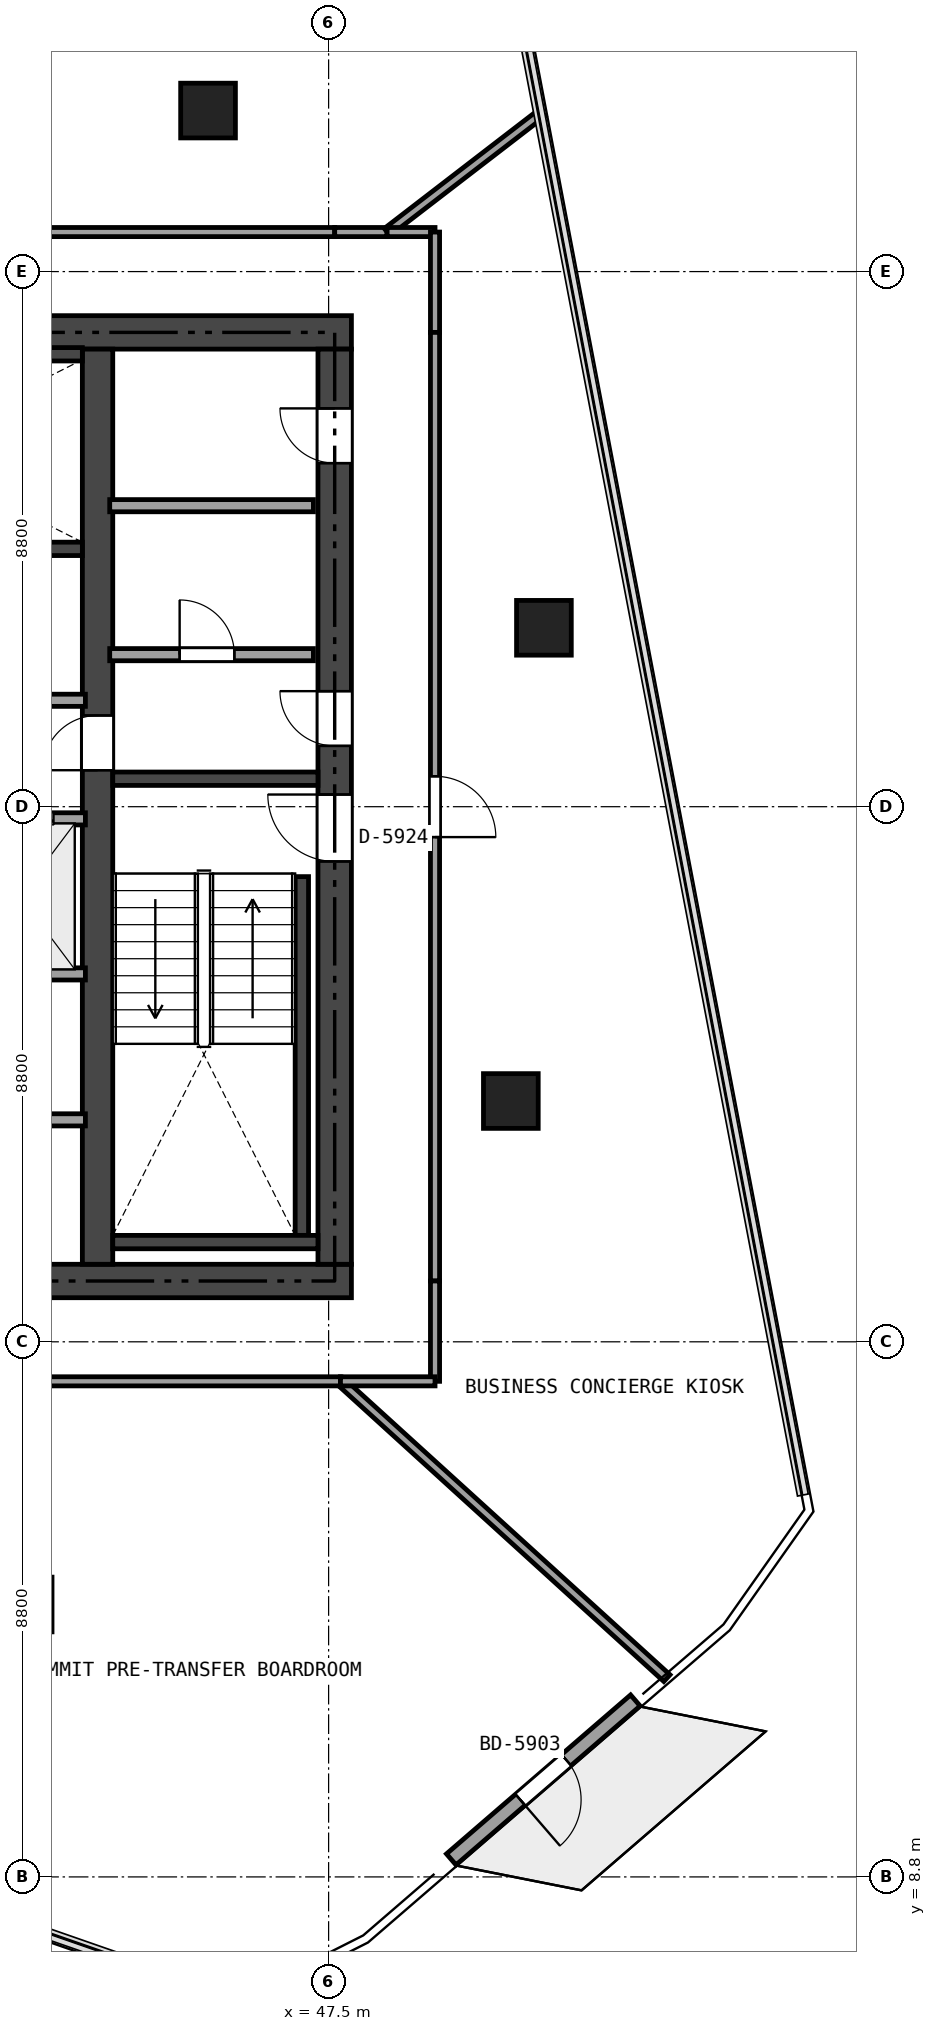
"""IFC4 building model, lengths in metres.
Left out: names, types, materials, properties, quantities, classifications, styles, units other than length and angle.
Written with IfcOpenShell. Run it as: python <this file> out.ifc"""

import sys

from ifc_helpers import new_model, si_unit, direction, frame, frame_2d, origin, origin_2d, place, context, subcontext, project, spatial, rectangle, extrude, element, fill, save


model = new_model("IFC4")
c1 = context("Model", 3, precision=1e-05, world=origin(), true_north=direction((0.0, 1.0)))
c2 = subcontext(c1, "Body", "Model", "MODEL_VIEW")
j1 = project(units=[si_unit("LENGTHUNIT", "METRE"), si_unit("PLANEANGLEUNIT", "RADIAN")], contexts=[c1])
p1 = place(None, origin())
s1 = spatial("IfcSite", under=j1, at=p1, CompositionType="ELEMENT")
p2 = place(p1, origin())
s2 = spatial("IfcBuilding", under=s1, at=p2, CompositionType="ELEMENT")
p3 = place(p2, frame((0.0, 0.0, 220.2)))
s3 = spatial("IfcBuildingStorey", under=s2, at=p3, CompositionType="ELEMENT", Elevation=220.2)
p4 = place(p3, frame((26.525, 18.6, 0.0), z_axis=(0.0, 0.0, 1.0), x_axis=(1.0, 0.0, 0.0)))
e1 = element("IfcWall", 1, at=p4, inside=s3, PredefinedType="SHEAR", context=c2, shape_type="SweptSolid", body=[
    extrude(rectangle(XDim=21.35, YDim=0.55, at=frame_2d((10.675, 0.0))), origin(), (0.0, 0.0, 1.0), 3.24),
])
p5 = place(p4, frame((12.4, 0.0, 0.0)))
e2 = element("IfcOpeningElement", 2, at=p5, cuts=e1, PredefinedType="OPENING", context=c2, shape_type="SweptSolid", body=[
    extrude(rectangle(XDim=1.15, YDim=2.15, at=frame_2d((0.575, 1.075))), frame((0.0, 0.285, 0.0), z_axis=(0.0, -1.0, 0.0), x_axis=(1.0, 0.0, 0.0)), (0.0, 0.0, 1.0), 0.57),
])
p6 = place(p4, frame((5.225, 0.0, 0.0)))
e3 = element("IfcOpeningElement", 3, at=p6, cuts=e1, PredefinedType="OPENING", context=c2, shape_type="SweptSolid", body=[
    extrude(rectangle(XDim=0.9, YDim=2.1, at=frame_2d((0.45, 1.05))), frame((0.0, 0.285, 0.0), z_axis=(0.0, -1.0, 0.0), x_axis=(1.0, 0.0, 0.0)), (0.0, 0.0, 1.0), 0.57),
])
p7 = place(p3, frame((26.525, 34.2, 0.0), z_axis=(0.0, 0.0, 1.0), x_axis=(1.0, 0.0, 0.0)))
e4 = element("IfcWall", 4, at=p7, inside=s3, PredefinedType="SHEAR", context=c2, shape_type="SweptSolid", body=[
    extrude(rectangle(XDim=21.35, YDim=0.55, at=frame_2d((10.675, 0.0))), origin(), (0.0, 0.0, 1.0), 3.24),
])
p8 = place(p7, frame((9.675, 0.0, 0.0)))
e5 = element("IfcOpeningElement", 5, at=p8, cuts=e4, PredefinedType="OPENING", context=c2, shape_type="SweptSolid", body=[
    extrude(rectangle(XDim=1.1, YDim=2.15, at=frame_2d((0.55, 1.075))), frame((0.0, 0.285, 0.0), z_axis=(0.0, -1.0, 0.0), x_axis=(1.0, 0.0, 0.0)), (0.0, 0.0, 1.0), 0.57),
])
p9 = place(p7, frame((1.925, 0.0, 0.0)))
e6 = element("IfcOpeningElement", 6, at=p9, cuts=e4, PredefinedType="OPENING", context=c2, shape_type="SweptSolid", body=[
    extrude(rectangle(XDim=0.9, YDim=2.1, at=frame_2d((0.45, 1.05))), frame((0.0, 0.285, 0.0), z_axis=(0.0, -1.0, 0.0), x_axis=(1.0, 0.0, 0.0)), (0.0, 0.0, 1.0), 0.57),
])
p10 = place(p7, frame((6.225, 0.0, 0.0)))
e7 = element("IfcOpeningElement", 7, at=p10, cuts=e4, PredefinedType="OPENING", context=c2, shape_type="SweptSolid", body=[
    extrude(rectangle(XDim=0.9, YDim=2.1, at=frame_2d((0.45, 1.05))), frame((0.0, 0.285, 0.0), z_axis=(0.0, -1.0, 0.0), x_axis=(1.0, 0.0, 0.0)), (0.0, 0.0, 1.0), 0.57),
])
p11 = place(p3, frame((47.6, 18.875, 0.0), z_axis=(0.0, 0.0, 1.0), x_axis=(0.0, 1.0, 0.0)))
e8 = element("IfcWall", 8, at=p11, inside=s3, PredefinedType="SHEAR", context=c2, shape_type="SweptSolid", body=[
    extrude(rectangle(XDim=15.05, YDim=0.55, at=frame_2d((7.525, 0.0))), origin(), (0.0, 0.0, 1.0), 3.24),
])
p12 = place(p11, frame((6.625, 0.0, 0.0)))
e9 = element("IfcOpeningElement", 9, at=p12, cuts=e8, PredefinedType="OPENING", context=c2, shape_type="SweptSolid", body=[
    extrude(rectangle(XDim=1.1, YDim=2.15, at=frame_2d((0.55, 1.075))), frame((0.0, 0.285, 0.0), z_axis=(0.0, -1.0, 0.0), x_axis=(1.0, 0.0, 0.0)), (0.0, 0.0, 1.0), 0.57),
])
p13 = place(p11, frame((8.525, 0.0, 0.0)))
e10 = element("IfcOpeningElement", 10, at=p13, cuts=e8, PredefinedType="OPENING", context=c2, shape_type="SweptSolid", body=[
    extrude(rectangle(XDim=0.9, YDim=2.1, at=frame_2d((0.45, 1.05))), frame((0.0, 0.285, 0.0), z_axis=(0.0, -1.0, 0.0), x_axis=(1.0, 0.0, 0.0)), (0.0, 0.0, 1.0), 0.57),
])
p14 = place(p11, frame((13.175, 0.0, 0.0)))
e11 = element("IfcOpeningElement", 11, at=p14, cuts=e8, PredefinedType="OPENING", context=c2, shape_type="SweptSolid", body=[
    extrude(rectangle(XDim=0.9, YDim=2.1, at=frame_2d((0.45, 1.05))), frame((0.0, 0.285, 0.0), z_axis=(0.0, -1.0, 0.0), x_axis=(1.0, 0.0, 0.0)), (0.0, 0.0, 1.0), 0.57),
])
p15 = place(p3, frame((43.7, 18.875, 0.0), z_axis=(0.0, 0.0, 1.0), x_axis=(0.0, 1.0, 0.0)))
e12 = element("IfcWall", 12, at=p15, inside=s3, PredefinedType="SHEAR", context=c2, shape_type="SweptSolid", body=[
    extrude(rectangle(XDim=15.05, YDim=0.5, at=frame_2d((7.525, 0.0))), origin(), (0.0, 0.0, 1.0), 3.24),
])
p16 = place(p15, frame((8.125, 0.0, 0.0)))
e13 = element("IfcOpeningElement", 13, at=p16, cuts=e12, PredefinedType="OPENING", context=c2, shape_type="SweptSolid", body=[
    extrude(rectangle(XDim=0.9, YDim=2.1, at=frame_2d((0.45, 1.05))), frame((0.0, 0.26, 0.0), z_axis=(0.0, -1.0, 0.0), x_axis=(1.0, 0.0, 0.0)), (0.0, 0.0, 1.0), 0.52),
])
p17 = place(p3, frame((43.95, 26.86, 0.0), z_axis=(0.0, 0.0, 1.0), x_axis=(1.0, 0.0, 0.0)))
e14 = element("IfcWall", 14, at=p17, inside=s3, PredefinedType="SHEAR", context=c2, shape_type="SweptSolid", body=[
    extrude(rectangle(XDim=3.375, YDim=0.22, at=frame_2d((1.688, 0.0))), origin(), (0.0, 0.0, 1.0), 3.24),
])
p18 = place(p3, frame((47.06, 19.35, 0.0), z_axis=(0.0, 0.0, 1.0), x_axis=(0.0, 1.0, 0.0)))
e15 = element("IfcWall", 15, at=p18, inside=s3, PredefinedType="SHEAR", context=c2, shape_type="SweptSolid", body=[
    extrude(rectangle(XDim=5.9, YDim=0.22, at=frame_2d((2.95, 0.0))), origin(), (0.0, 0.0, 1.0), 3.24),
])
p19 = place(p3, frame((43.95, 19.24, 0.0), z_axis=(0.0, 0.0, 1.0), x_axis=(1.0, 0.0, 0.0)))
e16 = element("IfcWall", 16, at=p19, inside=s3, PredefinedType="SHEAR", context=c2, shape_type="SweptSolid", body=[
    extrude(rectangle(XDim=3.375, YDim=0.22, at=frame_2d((1.688, 0.0))), origin(), (0.0, 0.0, 1.0), 3.24),
])
p20 = place(p3, frame((35.84, 30.64, 0.0), z_axis=(0.0, 0.0, 1.0), x_axis=(1.0, 0.0, 0.0)))
e17 = element("IfcWall", 17, at=p20, inside=s3, PredefinedType="SHEAR", context=c2, shape_type="SweptSolid", body=[
    extrude(rectangle(XDim=7.61, YDim=0.22, at=frame_2d((3.805, 0.0))), origin(), (0.0, 0.0, 1.0), 3.24),
])
p21 = place(p3, frame((37.55, 33.84, 0.0), z_axis=(0.0, 0.0, 1.0), x_axis=(1.0, 0.0, 0.0)))
e18 = element("IfcWall", 18, at=p21, inside=s3, PredefinedType="SHEAR", context=c2, shape_type="SweptSolid", body=[
    extrude(rectangle(XDim=5.9, YDim=0.22, at=frame_2d((2.95, 0.0))), origin(), (0.0, 0.0, 1.0), 3.24),
])
for number, where, z_axis, x_axis in (
    (19, (51.041, 29.342, 0.0), (0.0, 0.0, 1.0), (1.0, 0.0, 0.0)),
    (20, (45.517, 37.848, 0.0), (0.0, 0.0, 1.0), (1.0, 0.0, 0.0)),
    (21, (42.501, 13.28, 0.0), (0.0, 0.0, 1.0), (1.0, 0.0, 0.0)),
    (22, (50.497, 21.56, 0.0), (0.0, 0.0, 1.0), (1.0, 0.0, 0.0)),
):
    element("IfcColumn", number, at=place(p3, frame(where, z_axis=z_axis, x_axis=x_axis)), inside=s3, PredefinedType="COLUMN", context=c2, shape_type="SweptSolid", body=[
        extrude(rectangle(XDim=0.9, YDim=0.9, at=origin_2d()), origin(), (0.0, 0.0, 1.0), 3.24),
    ])
p22 = place(p3, frame((52.545, 11.702, 0.0), z_axis=(0.0, 0.0, 1.0), x_axis=(-0.756938273596, -0.653486380857, 0.0)))
e23 = element("IfcWall", 23, at=p22, inside=s3, PredefinedType="SOLIDWALL", context=c2, shape_type="SweptSolid", body=[
    extrude(rectangle(XDim=4.0, YDim=0.24, at=frame_2d((2.0, 0.0))), origin(), (0.0, 0.0, 1.0), 3.24),
])
p23 = place(p22, frame((1.5, 0.0, 0.0)))
e24 = element("IfcOpeningElement", 24, at=p23, cuts=e23, PredefinedType="OPENING", context=c2, shape_type="SweptSolid", body=[
    extrude(rectangle(XDim=1.0, YDim=2.15, at=frame_2d((0.5, 1.075))), frame((0.0, 0.13, 0.0), z_axis=(0.0, -1.0, 0.0), x_axis=(1.0, 0.0, 0.0)), (0.0, 0.0, 1.0), 0.26),
])
p24 = place(p3, frame((43.9, 28.9, 0.0), z_axis=(0.0, 0.0, 1.0), x_axis=(1.0, 0.0, 0.0)))
e25 = element("IfcWall", 25, at=p24, inside=s3, PredefinedType="SOLIDWALL", context=c2, shape_type="SweptSolid", body=[
    extrude(rectangle(XDim=3.35, YDim=0.2, at=frame_2d((1.675, 0.0))), origin(), (0.0, 0.0, 1.0), 3.24),
])
p25 = place(p24, frame((1.15, 0.0, 0.0)))
e26 = element("IfcOpeningElement", 26, at=p25, cuts=e25, PredefinedType="OPENING", context=c2, shape_type="SweptSolid", body=[
    extrude(rectangle(XDim=0.9, YDim=2.1, at=frame_2d((0.45, 1.05))), frame((0.0, 0.11, 0.0), z_axis=(0.0, -1.0, 0.0), x_axis=(1.0, 0.0, 0.0)), (0.0, 0.0, 1.0), 0.22),
])
p26 = place(p3, frame((43.9, 31.35, 0.0), z_axis=(0.0, 0.0, 1.0), x_axis=(1.0, 0.0, 0.0)))
e27 = element("IfcWall", 27, at=p26, inside=s3, PredefinedType="SOLIDWALL", context=c2, shape_type="SweptSolid", body=[
    extrude(rectangle(XDim=3.35, YDim=0.2, at=frame_2d((1.675, 0.0))), origin(), (0.0, 0.0, 1.0), 3.24),
])
p27 = place(p3, frame((35.62, 28.15, 0.0), z_axis=(0.0, 0.0, 1.0), x_axis=(1.0, 0.0, 0.0)))
e28 = element("IfcWall", 28, at=p27, inside=s3, PredefinedType="SOLIDWALL", context=c2, shape_type="SweptSolid", body=[
    extrude(rectangle(XDim=7.88, YDim=0.2, at=frame_2d((3.94, 0.0))), origin(), (0.0, 0.0, 1.0), 3.24),
])
p28 = place(p3, frame((35.62, 26.2, 0.0), z_axis=(0.0, 0.0, 1.0), x_axis=(1.0, 0.0, 0.0)))
e29 = element("IfcWall", 29, at=p28, inside=s3, PredefinedType="SOLIDWALL", context=c2, shape_type="SweptSolid", body=[
    extrude(rectangle(XDim=7.88, YDim=0.2, at=frame_2d((3.94, 0.0))), origin(), (0.0, 0.0, 1.0), 3.24),
])
p29 = place(p28, frame((0.405, 0.0, 0.0)))
e30 = element("IfcOpeningElement", 30, at=p29, cuts=e29, PredefinedType="OPENING", context=c2, shape_type="SweptSolid", body=[
    extrude(rectangle(XDim=1.1, YDim=2.15, at=frame_2d((0.55, 1.075))), frame((0.0, 0.11, 0.0), z_axis=(0.0, -1.0, 0.0), x_axis=(1.0, 0.0, 0.0)), (0.0, 0.0, 1.0), 0.22),
])
p30 = place(p28, frame((2.355, 0.0, 0.0)))
e31 = element("IfcOpeningElement", 31, at=p30, cuts=e29, PredefinedType="OPENING", context=c2, shape_type="SweptSolid", body=[
    extrude(rectangle(XDim=1.1, YDim=2.15, at=frame_2d((0.55, 1.075))), frame((0.0, 0.11, 0.0), z_axis=(0.0, -1.0, 0.0), x_axis=(1.0, 0.0, 0.0)), (0.0, 0.0, 1.0), 0.22),
])
p31 = place(p28, frame((4.305, 0.0, 0.0)))
e32 = element("IfcOpeningElement", 32, at=p31, cuts=e29, PredefinedType="OPENING", context=c2, shape_type="SweptSolid", body=[
    extrude(rectangle(XDim=1.1, YDim=2.15, at=frame_2d((0.55, 1.075))), frame((0.0, 0.11, 0.0), z_axis=(0.0, -1.0, 0.0), x_axis=(1.0, 0.0, 0.0)), (0.0, 0.0, 1.0), 0.22),
])
p32 = place(p28, frame((6.255, 0.0, 0.0)))
e33 = element("IfcOpeningElement", 33, at=p32, cuts=e29, PredefinedType="OPENING", context=c2, shape_type="SweptSolid", body=[
    extrude(rectangle(XDim=1.1, YDim=2.15, at=frame_2d((0.55, 1.075))), frame((0.0, 0.11, 0.0), z_axis=(0.0, -1.0, 0.0), x_axis=(1.0, 0.0, 0.0)), (0.0, 0.0, 1.0), 0.22),
])
p33 = place(p3, frame((35.62, 23.65, 0.0), z_axis=(0.0, 0.0, 1.0), x_axis=(1.0, 0.0, 0.0)))
e34 = element("IfcWall", 34, at=p33, inside=s3, PredefinedType="SOLIDWALL", context=c2, shape_type="SweptSolid", body=[
    extrude(rectangle(XDim=7.88, YDim=0.2, at=frame_2d((3.94, 0.0))), origin(), (0.0, 0.0, 1.0), 2.761),
])
p34 = place(p3, frame((35.62, 21.25, 0.0), z_axis=(0.0, 0.0, 1.0), x_axis=(1.0, 0.0, 0.0)))
e35 = element("IfcWall", 35, at=p34, inside=s3, PredefinedType="SOLIDWALL", context=c2, shape_type="SweptSolid", body=[
    extrude(rectangle(XDim=7.88, YDim=0.2, at=frame_2d((3.94, 0.0))), origin(), (0.0, 0.0, 1.0), 3.24),
])
p35 = place(p34, frame((1.13, 0.0, 0.0)))
e36 = element("IfcOpeningElement", 36, at=p35, cuts=e35, PredefinedType="OPENING", context=c2, shape_type="SweptSolid", body=[
    extrude(rectangle(XDim=0.9, YDim=2.1, at=frame_2d((0.45, 1.05))), frame((0.0, 0.11, 0.0), z_axis=(0.0, -1.0, 0.0), x_axis=(1.0, 0.0, 0.0)), (0.0, 0.0, 1.0), 0.22),
])
p36 = place(p34, frame((5.73, 0.0, 0.0)))
e37 = element("IfcOpeningElement", 37, at=p36, cuts=e35, PredefinedType="OPENING", context=c2, shape_type="SweptSolid", body=[
    extrude(rectangle(XDim=0.9, YDim=2.1, at=frame_2d((0.45, 1.05))), frame((0.0, 0.11, 0.0), z_axis=(0.0, -1.0, 0.0), x_axis=(1.0, 0.0, 0.0)), (0.0, 0.0, 1.0), 0.22),
])
p37 = place(p3, frame((42.87, 35.85, 0.0), z_axis=(0.0, 0.0, 1.0), x_axis=(1.0, 0.0, 0.0)))
e38 = element("IfcWall", 38, at=p37, inside=s3, PredefinedType="PARTITIONING", context=c2, shape_type="SweptSolid", body=[
    extrude(rectangle(XDim=4.73, YDim=0.15, at=frame_2d((2.365, 0.0))), origin(), (0.0, 0.0, 1.0), 2.617),
])
p38 = place(p3, frame((47.6, 35.85, 0.0), z_axis=(0.0, 0.0, 1.0), x_axis=(1.0, 0.0, 0.0)))
e39 = element("IfcWall", 39, at=p38, inside=s3, PredefinedType="PARTITIONING", context=c2, shape_type="SweptSolid", body=[
    extrude(rectangle(XDim=0.862, YDim=0.15, at=frame_2d((0.431, 0.0))), origin(), (0.0, 0.0, 1.0), 3.24),
])
p39 = place(p3, frame((48.462, 35.85, 0.0), z_axis=(0.0, 0.0, 1.0), x_axis=(0.7925055996, 0.609864636294, 0.0)))
e40 = element("IfcWall", 40, at=p39, inside=s3, PredefinedType="PARTITIONING", context=c2, shape_type="SweptSolid", body=[
    extrude(rectangle(XDim=3.22, YDim=0.15, at=frame_2d((1.61, 0.0))), origin(), (0.0, 0.0, 1.0), 3.24),
])
p40 = place(p3, frame((53.064, 12.069, 0.0), z_axis=(0.0, 0.0, 1.0), x_axis=(-0.739937028387, 0.672676143491, 0.0)))
e41 = element("IfcWall", 41, at=p40, inside=s3, PredefinedType="PARTITIONING", context=c2, shape_type="SweptSolid", body=[
    extrude(rectangle(XDim=7.256, YDim=0.15, at=frame_2d((3.628, 0.0))), origin(), (0.0, 0.0, 1.0), 3.24),
])
p41 = place(p3, frame((47.695, 16.95, 0.0), z_axis=(0.0, 0.0, 1.0), x_axis=(-1.0, 0.0, 0.0)))
e42 = element("IfcWall", 42, at=p41, inside=s3, PredefinedType="PARTITIONING", context=c2, shape_type="SweptSolid", body=[
    extrude(rectangle(XDim=12.851, YDim=0.15, at=frame_2d((6.426, 0.0))), origin(), (0.0, 0.0, 1.0), 2.617),
])
p42 = place(p41, frame((5.926, 0.0, 0.0)))
e43 = element("IfcOpeningElement", 43, at=p42, cuts=e42, PredefinedType="OPENING", context=c2, shape_type="SweptSolid", body=[
    extrude(rectangle(XDim=1.0, YDim=2.15, at=frame_2d((0.5, 1.075))), frame((0.0, 0.085, 0.0), z_axis=(0.0, -1.0, 0.0), x_axis=(1.0, 0.0, 0.0)), (0.0, 0.0, 1.0), 0.17),
])
p43 = place(p3, frame((48.462, 35.85, 0.0), z_axis=(0.0, 0.0, 1.0), x_axis=(1.0, 0.0, 0.0)))
e44 = element("IfcWall", 44, at=p43, inside=s3, PredefinedType="PARTITIONING", context=c2, shape_type="SweptSolid", body=[
    extrude(rectangle(XDim=0.788, YDim=0.15, at=frame_2d((0.394, 0.0))), origin(), (0.0, 0.0, 1.0), 3.24),
])
p44 = place(p3, frame((49.25, 35.85, 0.0), z_axis=(0.0, 0.0, 1.0), x_axis=(0.0, -1.0, 0.0)))
e45 = element("IfcWall", 45, at=p44, inside=s3, PredefinedType="PARTITIONING", context=c2, shape_type="SweptSolid", body=[
    extrude(rectangle(XDim=1.65, YDim=0.15, at=frame_2d((0.825, 0.0))), origin(), (0.0, 0.0, 1.0), 3.24),
])
p45 = place(p3, frame((49.25, 34.2, 0.0), z_axis=(0.0, 0.0, 1.0), x_axis=(0.0, -1.0, 0.0)))
e46 = element("IfcWall", 46, at=p45, inside=s3, PredefinedType="PARTITIONING", context=c2, shape_type="SweptSolid", body=[
    extrude(rectangle(XDim=15.6, YDim=0.15, at=frame_2d((7.8, 0.0))), origin(), (0.0, 0.0, 1.0), 2.617),
])
p46 = place(p45, frame((7.3, 0.0, 0.0)))
e47 = element("IfcOpeningElement", 47, at=p46, cuts=e46, PredefinedType="OPENING", context=c2, shape_type="SweptSolid", body=[
    extrude(rectangle(XDim=1.0, YDim=2.15, at=frame_2d((0.5, 1.075))), frame((0.0, 0.085, 0.0), z_axis=(0.0, -1.0, 0.0), x_axis=(1.0, 0.0, 0.0)), (0.0, 0.0, 1.0), 0.17),
])
p47 = place(p3, frame((49.25, 18.6, 0.0), z_axis=(0.0, 0.0, 1.0), x_axis=(0.0, -1.0, 0.0)))
e48 = element("IfcWall", 48, at=p47, inside=s3, PredefinedType="PARTITIONING", context=c2, shape_type="SweptSolid", body=[
    extrude(rectangle(XDim=1.65, YDim=0.15, at=frame_2d((0.825, 0.0))), origin(), (0.0, 0.0, 1.0), 3.24),
])
p48 = place(p3, frame((49.25, 16.95, 0.0), z_axis=(0.0, 0.0, 1.0), x_axis=(-1.0, 0.0, 0.0)))
e49 = element("IfcWall", 49, at=p48, inside=s3, PredefinedType="PARTITIONING", context=c2, shape_type="SweptSolid", body=[
    extrude(rectangle(XDim=1.555, YDim=0.15, at=frame_2d((0.777, 0.0))), origin(), (0.0, 0.0, 1.0), 3.24),
])
p49 = place(p23, origin())
e50 = element("IfcDoor", 50, at=p49, inside=s3, OperationType="SINGLE_SWING_RIGHT", PredefinedType="DOOR", context=c2, shape_type="SweptSolid", body=[
    extrude(rectangle(XDim=1.0, YDim=2.15, at=frame_2d((0.5, 1.075))), frame((0.0, 0.025, 0.0), z_axis=(0.0, -1.0, 0.0), x_axis=(1.0, 0.0, 0.0)), (0.0, 0.0, 1.0), 0.05),
])
fill(e24, e50)
p50 = place(p12, origin())
e51 = element("IfcDoor", 51, at=p50, inside=s3, OperationType="SINGLE_SWING_RIGHT", PredefinedType="DOOR", context=c2, shape_type="SweptSolid", body=[
    extrude(rectangle(XDim=1.1, YDim=2.15, at=frame_2d((0.55, 1.075))), frame((0.0, 0.025, 0.0), z_axis=(0.0, -1.0, 0.0), x_axis=(1.0, 0.0, 0.0)), (0.0, 0.0, 1.0), 0.05),
])
fill(e9, e51)
p51 = place(p16, origin())
e52 = element("IfcDoor", 52, at=p51, inside=s3, OperationType="SINGLE_SWING_LEFT", PredefinedType="DOOR", context=c2, shape_type="SweptSolid", body=[
    extrude(rectangle(XDim=0.9, YDim=2.1, at=frame_2d((0.45, 1.05))), frame((0.0, 0.025, 0.0), z_axis=(0.0, -1.0, 0.0), x_axis=(1.0, 0.0, 0.0)), (0.0, 0.0, 1.0), 0.05),
])
fill(e13, e52)
p52 = place(p13, origin())
e53 = element("IfcDoor", 53, at=p52, inside=s3, OperationType="SINGLE_SWING_RIGHT", PredefinedType="DOOR", context=c2, shape_type="SweptSolid", body=[
    extrude(rectangle(XDim=0.9, YDim=2.1, at=frame_2d((0.45, 1.05))), frame((0.0, 0.025, 0.0), z_axis=(0.0, -1.0, 0.0), x_axis=(1.0, 0.0, 0.0)), (0.0, 0.0, 1.0), 0.05),
])
fill(e10, e53)
p53 = place(p25, origin())
e54 = element("IfcDoor", 54, at=p53, inside=s3, OperationType="SINGLE_SWING_LEFT", PredefinedType="DOOR", context=c2, shape_type="SweptSolid", body=[
    extrude(rectangle(XDim=0.9, YDim=2.1, at=frame_2d((0.45, 1.05))), frame((0.0, 0.025, 0.0), z_axis=(0.0, -1.0, 0.0), x_axis=(1.0, 0.0, 0.0)), (0.0, 0.0, 1.0), 0.05),
])
fill(e26, e54)
p54 = place(p14, origin())
e55 = element("IfcDoor", 55, at=p54, inside=s3, OperationType="SINGLE_SWING_RIGHT", PredefinedType="DOOR", context=c2, shape_type="SweptSolid", body=[
    extrude(rectangle(XDim=0.9, YDim=2.1, at=frame_2d((0.45, 1.05))), frame((0.0, 0.025, 0.0), z_axis=(0.0, -1.0, 0.0), x_axis=(1.0, 0.0, 0.0)), (0.0, 0.0, 1.0), 0.05),
])
fill(e11, e55)
p55 = place(p32, origin())
e56 = element("IfcDoor", 56, at=p55, inside=s3, OperationType="SLIDING_TO_LEFT", PredefinedType="DOOR", context=c2, shape_type="SweptSolid", body=[
    extrude(rectangle(XDim=1.1, YDim=2.15, at=frame_2d((0.55, 1.075))), frame((0.0, 0.025, 0.0), z_axis=(0.0, -1.0, 0.0), x_axis=(1.0, 0.0, 0.0)), (0.0, 0.0, 1.0), 0.05),
])
fill(e33, e56)
p56 = place(p46, origin())
e57 = element("IfcDoor", 57, at=p56, inside=s3, OperationType="SINGLE_SWING_RIGHT", PredefinedType="DOOR", context=c2, shape_type="SweptSolid", body=[
    extrude(rectangle(XDim=1.0, YDim=2.15, at=frame_2d((0.5, 1.075))), frame((0.0, 0.025, 0.0), z_axis=(0.0, -1.0, 0.0), x_axis=(1.0, 0.0, 0.0)), (0.0, 0.0, 1.0), 0.05),
])
fill(e47, e57)
save(model, sys.argv[1])
